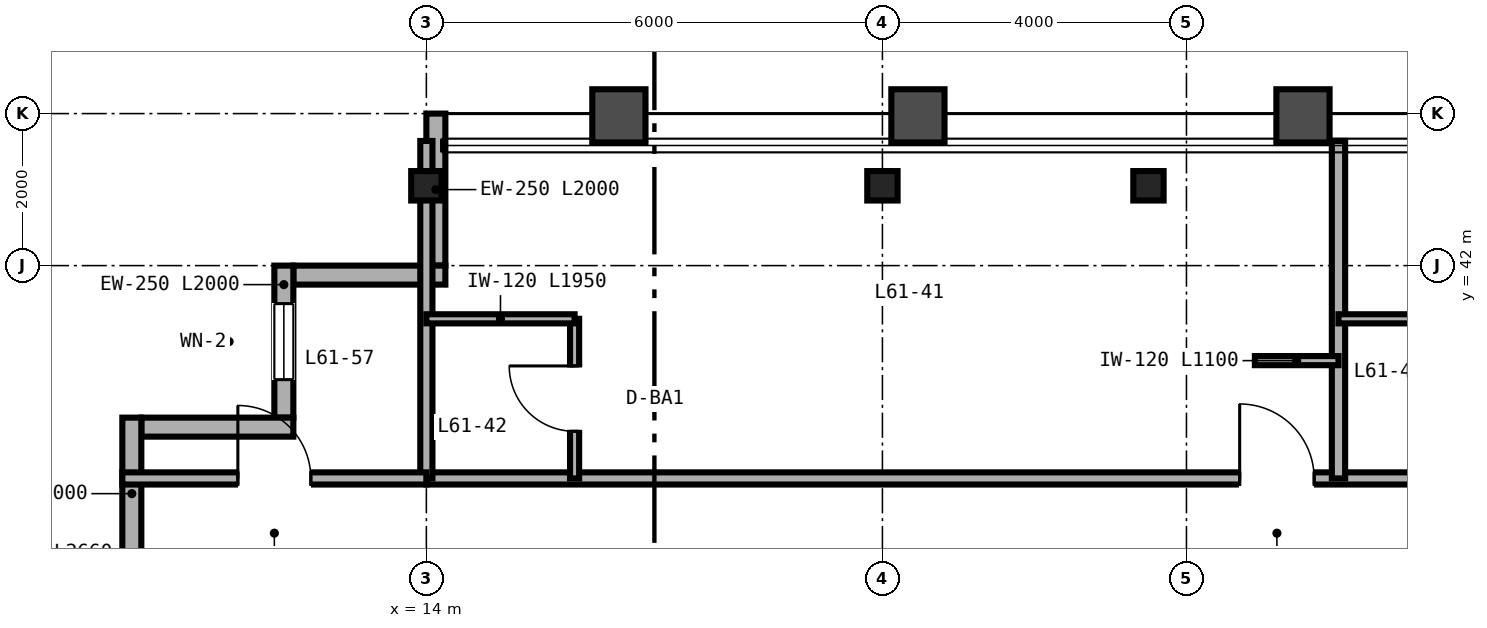
"""IFC4 building model, lengths in metres.
Left out: names, types, materials, properties, quantities, classifications, styles, units other than length and angle.
Written with IfcOpenShell. Run it as: python <this file> out.ifc"""

import sys

from ifc_helpers import new_model, si_unit, direction, frame, frame_2d, origin, origin_2d, place, context, subcontext, project, spatial, rectangle, i_section, extrude, source, transform, mapped, element, fill, save


model = new_model("IFC4")
c1 = context("Model", 3, precision=1e-05, world=origin(), true_north=direction((0.0, 1.0)))
c2 = subcontext(c1, "Body", "Model", "MODEL_VIEW")
j1 = project(units=[si_unit("LENGTHUNIT", "METRE"), si_unit("PLANEANGLEUNIT", "RADIAN")], contexts=[c1])
p1 = place(None, origin())
s1 = spatial("IfcSite", under=j1, at=p1, CompositionType="ELEMENT")
p2 = place(p1, origin())
s2 = spatial("IfcBuilding", under=s1, at=p2, CompositionType="ELEMENT")
p3 = place(p2, frame((0.0, 0.0, 243.6)))
s3 = spatial("IfcBuildingStorey", under=s2, at=p3, CompositionType="ELEMENT", Elevation=243.6)
m1 = source(origin(), c2, "Body", "SweptSolid", [
    extrude(i_section(OverallWidth=0.399, OverallDepth=0.387, WebThickness=0.021, FlangeThickness=0.033, FilletRadius=0.025, at=origin_2d()), origin(), (0.0, 0.0, 1.0), 3.28),
])
for number, where, z_axis, x_axis in (
    (1, (14.0, 43.05, 0.0), (0.0, 0.0, 1.0), (1.0, 0.0, 0.0)),
    (2, (20.0, 43.05, 0.0), (0.0, 0.0, 1.0), (1.0, 0.0, 0.0)),
    (3, (23.5, 43.05, 0.0), (0.0, 0.0, 1.0), (1.0, 0.0, 0.0)),
):
    element("IfcColumn", number, at=place(p3, frame(where, z_axis=z_axis, x_axis=x_axis)), inside=s3, PredefinedType="COLUMN", context=c2, shape_type="MappedRepresentation", body=[
        mapped(m1, transform((0.0, 0.0, 0.0), scale=1.0)),
    ])
p4 = place(p3, frame((14.125, 44.0, 0.0), z_axis=(0.0, 0.0, 1.0), x_axis=(0.0, -1.0, 0.0)))
e4 = element("IfcWall", 4, at=p4, inside=s3, PredefinedType="SOLIDWALL", context=c2, shape_type="SweptSolid", body=[
    extrude(rectangle(XDim=2.0, YDim=0.25, at=frame_2d((1.0, 0.0))), origin(), (0.0, 0.0, 1.0), 2.587),
])
p5 = place(p3, frame((14.25, 41.875, 0.0), z_axis=(0.0, 0.0, 1.0), x_axis=(-1.0, 0.0, 0.0)))
e5 = element("IfcWall", 5, at=p5, inside=s3, PredefinedType="SOLIDWALL", context=c2, shape_type="SweptSolid", body=[
    extrude(rectangle(XDim=2.0, YDim=0.25, at=frame_2d((1.0, 0.0))), origin(), (0.0, 0.0, 1.0), 3.28),
])
p6 = place(p3, frame((12.125, 42.0, 0.0), z_axis=(0.0, 0.0, 1.0), x_axis=(0.0, -1.0, 0.0)))
e6 = element("IfcWall", 6, at=p6, inside=s3, PredefinedType="SOLIDWALL", context=c2, shape_type="SweptSolid", body=[
    extrude(rectangle(XDim=2.0, YDim=0.25, at=frame_2d((1.0, 0.0))), origin(), (0.0, 0.0, 1.0), 3.28),
])
p7 = place(p6, frame((0.5, 0.0, 0.85)))
e7 = element("IfcOpeningElement", 7, at=p7, cuts=e6, PredefinedType="OPENING", context=c2, shape_type="SweptSolid", body=[
    extrude(rectangle(XDim=1.0, YDim=1.9, at=frame_2d((0.5, 0.95))), frame((0.0, 0.135, 0.0), z_axis=(0.0, -1.0, 0.0), x_axis=(1.0, 0.0, 0.0)), (0.0, 0.0, 1.0), 0.27),
])
for number, where, z_axis, x_axis in (
    (8, (12.25, 39.875, 0.0), (0.0, 0.0, 1.0), (-1.0, 0.0, 0.0)),
    (9, (10.125, 40.0, 0.0), (0.0, 0.0, 1.0), (0.0, -1.0, 0.0)),
):
    element("IfcWall", number, at=place(p3, frame(where, z_axis=z_axis, x_axis=x_axis)), inside=s3, PredefinedType="SOLIDWALL", context=c2, shape_type="SweptSolid", body=[
        extrude(rectangle(XDim=2.0, YDim=0.25, at=frame_2d((1.0, 0.0))), origin(), (0.0, 0.0, 1.0), 3.28),
    ])
p8 = place(p3, frame((14.0, 39.2, 0.0), z_axis=(0.0, 0.0, 1.0), x_axis=(1.0, 0.0, 0.0)))
e10 = element("IfcWall", 10, at=p8, inside=s3, PredefinedType="PARTITIONING", context=c2, shape_type="SweptSolid", body=[
    extrude(rectangle(XDim=36.0, YDim=0.16, at=frame_2d((18.0, 0.0))), origin(), (0.0, 0.0, 1.0), 2.823),
])
p9 = place(p8, frame((10.7, 0.0, 0.0)))
e11 = element("IfcOpeningElement", 11, at=p9, cuts=e10, PredefinedType="OPENING", context=c2, shape_type="SweptSolid", body=[
    extrude(rectangle(XDim=0.98, YDim=2.2, at=frame_2d((0.49, 1.1))), frame((0.0, 0.09, 0.0), z_axis=(0.0, -1.0, 0.0), x_axis=(1.0, 0.0, 0.0)), (0.0, 0.0, 1.0), 0.18),
])
p10 = place(p8, frame((22.7, 0.0, 0.0)))
e12 = element("IfcOpeningElement", 12, at=p10, cuts=e10, PredefinedType="OPENING", context=c2, shape_type="SweptSolid", body=[
    extrude(rectangle(XDim=0.98, YDim=2.2, at=frame_2d((0.49, 1.1))), frame((0.0, 0.09, 0.0), z_axis=(0.0, -1.0, 0.0), x_axis=(1.0, 0.0, 0.0)), (0.0, 0.0, 1.0), 0.18),
])
p11 = place(p8, frame((34.7, 0.0, 0.0)))
e13 = element("IfcOpeningElement", 13, at=p11, cuts=e10, PredefinedType="OPENING", context=c2, shape_type="SweptSolid", body=[
    extrude(rectangle(XDim=0.98, YDim=2.2, at=frame_2d((0.49, 1.1))), frame((0.0, 0.09, 0.0), z_axis=(0.0, -1.0, 0.0), x_axis=(1.0, 0.0, 0.0)), (0.0, 0.0, 1.0), 0.18),
])
p12 = place(p3, frame((14.0, 39.2, 0.0), z_axis=(0.0, 0.0, 1.0), x_axis=(0.0, 1.0, 0.0)))
e14 = element("IfcWall", 14, at=p12, inside=s3, PredefinedType="PARTITIONING", context=c2, shape_type="SweptSolid", body=[
    extrude(rectangle(XDim=4.44, YDim=0.16, at=frame_2d((2.22, 0.0))), origin(), (0.0, 0.0, 1.0), 2.587),
])
p13 = place(p3, frame((26.0, 39.2, 0.0), z_axis=(0.0, 0.0, 1.0), x_axis=(0.0, 1.0, 0.0)))
e15 = element("IfcWall", 15, at=p13, inside=s3, PredefinedType="PARTITIONING", context=c2, shape_type="SweptSolid", body=[
    extrude(rectangle(XDim=4.44, YDim=0.175, at=frame_2d((2.22, 0.0))), origin(), (0.0, 0.0, 1.0), 2.36),
])
p14 = place(p3, frame((15.95, 39.2, 0.0), z_axis=(0.0, 0.0, 1.0), x_axis=(0.0, 1.0, 0.0)))
e16 = element("IfcWall", 16, at=p14, inside=s3, PredefinedType="PARTITIONING", context=c2, shape_type="SweptSolid", body=[
    extrude(rectangle(XDim=2.1, YDim=0.12, at=frame_2d((1.05, 0.0))), origin(), (0.0, 0.0, 1.0), 3.28),
])
p15 = place(p14, frame((0.62, 0.0, 0.0)))
e17 = element("IfcOpeningElement", 17, at=p15, cuts=e16, PredefinedType="OPENING", context=c2, shape_type="SweptSolid", body=[
    extrude(rectangle(XDim=0.86, YDim=2.1, at=frame_2d((0.43, 1.05))), frame((0.0, 0.07, 0.0), z_axis=(0.0, -1.0, 0.0), x_axis=(1.0, 0.0, 0.0)), (0.0, 0.0, 1.0), 0.14),
])
p16 = place(p3, frame((14.0, 41.3, 0.0), z_axis=(0.0, 0.0, 1.0), x_axis=(1.0, 0.0, 0.0)))
e18 = element("IfcWall", 18, at=p16, inside=s3, PredefinedType="PARTITIONING", context=c2, shape_type="SweptSolid", body=[
    extrude(rectangle(XDim=1.95, YDim=0.12, at=frame_2d((0.975, 0.0))), origin(), (0.0, 0.0, 1.0), 3.28),
])
p17 = place(p3, frame((24.9, 40.75, 0.0), z_axis=(0.0, 0.0, 1.0), x_axis=(1.0, 0.0, 0.0)))
e19 = element("IfcWall", 19, at=p17, inside=s3, PredefinedType="PARTITIONING", context=c2, shape_type="SweptSolid", body=[
    extrude(rectangle(XDim=1.1, YDim=0.12, at=frame_2d((0.55, 0.0))), origin(), (0.0, 0.0, 1.0), 3.28),
])
p18 = place(p3, frame((26.0, 41.3, 0.0), z_axis=(0.0, 0.0, 1.0), x_axis=(1.0, 0.0, 0.0)))
e20 = element("IfcWall", 20, at=p18, inside=s3, PredefinedType="PARTITIONING", context=c2, shape_type="SweptSolid", body=[
    extrude(rectangle(XDim=1.95, YDim=0.12, at=frame_2d((0.975, 0.0))), origin(), (0.0, 0.0, 1.0), 3.28),
])
p19 = place(p3, frame((10.0, 39.2, 0.0), z_axis=(0.0, 0.0, 1.0), x_axis=(1.0, 0.0, 0.0)))
e21 = element("IfcWall", 21, at=p19, inside=s3, PredefinedType="PARTITIONING", context=c2, shape_type="SweptSolid", body=[
    extrude(rectangle(XDim=4.0, YDim=0.16, at=frame_2d((2.0, 0.0))), origin(), (0.0, 0.0, 1.0), 3.28),
])
p20 = place(p19, frame((1.52, 0.0, 0.0)))
e22 = element("IfcOpeningElement", 22, at=p20, cuts=e21, PredefinedType="OPENING", context=c2, shape_type="SweptSolid", body=[
    extrude(rectangle(XDim=0.96, YDim=2.15, at=frame_2d((0.48, 1.075))), frame((0.0, 0.09, 0.0), z_axis=(0.0, -1.0, 0.0), x_axis=(1.0, 0.0, 0.0)), (0.0, 0.0, 1.0), 0.18),
])
m2 = source(origin(), c2, "Body", "SweptSolid", [
    extrude(rectangle(XDim=1.0, YDim=1.9, at=frame_2d((0.5, 0.95))), frame((0.0, 0.03, 0.0), z_axis=(0.0, -1.0, 0.0), x_axis=(1.0, 0.0, 0.0)), (0.0, 0.0, 1.0), 0.06),
])
p21 = place(p7, origin())
e23 = element("IfcWindow", 23, at=p21, inside=s3, PartitioningType="SINGLE_PANEL", PredefinedType="WINDOW", context=c2, shape_type="MappedRepresentation", body=[
    mapped(m2, transform((0.0, 0.0, 0.0), scale=1.0)),
])
fill(e7, e23)
m3 = source(origin(), c2, "Body", "SweptSolid", [
    extrude(rectangle(XDim=0.86, YDim=2.1, at=frame_2d((0.43, 1.05))), frame((0.0, 0.025, 0.0), z_axis=(0.0, -1.0, 0.0), x_axis=(1.0, 0.0, 0.0)), (0.0, 0.0, 1.0), 0.05),
])
p22 = place(p15, origin())
e24 = element("IfcDoor", 24, at=p22, inside=s3, OperationType="SINGLE_SWING_RIGHT", PredefinedType="DOOR", context=c2, shape_type="MappedRepresentation", body=[
    mapped(m3, transform((0.0, 0.0, 0.0), scale=1.0)),
])
fill(e17, e24)
m4 = source(origin(), c2, "Body", "SweptSolid", [
    extrude(rectangle(XDim=0.98, YDim=2.2, at=frame_2d((0.49, 1.1))), frame((0.0, 0.025, 0.0), z_axis=(0.0, -1.0, 0.0), x_axis=(1.0, 0.0, 0.0)), (0.0, 0.0, 1.0), 0.05),
])
p23 = place(p9, origin())
e25 = element("IfcDoor", 25, at=p23, inside=s3, OperationType="SINGLE_SWING_LEFT", PredefinedType="DOOR", context=c2, shape_type="MappedRepresentation", body=[
    mapped(m4, transform((0.0, 0.0, 0.0), scale=1.0)),
])
fill(e11, e25)
m5 = source(origin(), c2, "Body", "SweptSolid", [
    extrude(rectangle(XDim=0.96, YDim=2.15, at=frame_2d((0.48, 1.075))), frame((0.0, 0.025, 0.0), z_axis=(0.0, -1.0, 0.0), x_axis=(1.0, 0.0, 0.0)), (0.0, 0.0, 1.0), 0.05),
])
p24 = place(p20, origin())
e26 = element("IfcDoor", 26, at=p24, inside=s3, OperationType="SINGLE_SWING_LEFT", PredefinedType="DOOR", context=c2, shape_type="MappedRepresentation", body=[
    mapped(m5, transform((0.0, 0.0, 0.0), scale=1.0)),
])
fill(e22, e26)
save(model, sys.argv[1])
